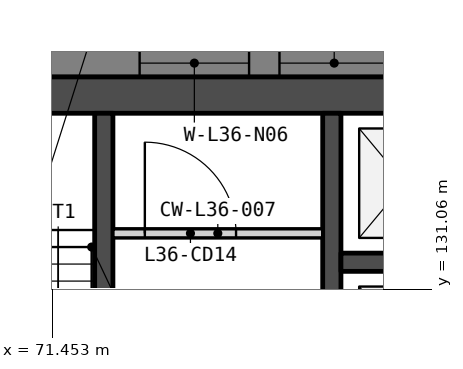
"""IFC4 building model, lengths in metres.
Left out: names, types, materials, properties, quantities, classifications, styles, units other than length and angle.
Written with IfcOpenShell. Run it as: python <this file> out.ifc"""

import sys

from ifc_helpers import new_model, si_unit, direction, frame, frame_2d, origin, place, context, subcontext, project, spatial, polyline, rectangle, outline, extrude, element, fill, save


model = new_model("IFC4")
c1 = context("Model", 3, precision=1e-05, world=origin(), true_north=direction((0.0, 1.0)))
c2 = subcontext(c1, "Body", "Model", "MODEL_VIEW")
j1 = project(units=[si_unit("LENGTHUNIT", "METRE"), si_unit("PLANEANGLEUNIT", "RADIAN")], contexts=[c1])
p1 = place(None, origin())
s1 = spatial("IfcSite", under=j1, at=p1, CompositionType="ELEMENT")
p2 = place(p1, origin())
s2 = spatial("IfcBuilding", under=s1, at=p2, CompositionType="ELEMENT")
p3 = place(p2, frame((0.0, 0.0, 144.2)))
s3 = spatial("IfcBuildingStorey", under=s2, at=p3, CompositionType="ELEMENT", Elevation=144.2)
p4 = place(p3, frame((69.0, 134.25, 0.0), z_axis=(0.0, 0.0, 1.0), x_axis=(1.0, 0.0, 0.0)))
e1 = element("IfcWall", 1, at=p4, inside=s3, PredefinedType="SOLIDWALL", context=c2, shape_type="SweptSolid", body=[
    extrude(rectangle(XDim=22.0, YDim=0.6, at=frame_2d((11.0, 0.0))), origin(), (0.0, 0.0, 1.0), 3.75),
])
p5 = place(p3, frame((72.3, 133.95, 0.0), z_axis=(0.0, 0.0, 1.0), x_axis=(0.0, -1.0, 0.0)))
e2 = element("IfcWall", 2, at=p5, inside=s3, PredefinedType="SOLIDWALL", context=c2, shape_type="SweptSolid", body=[
    extrude(rectangle(XDim=10.8, YDim=0.3, at=frame_2d((5.4, 0.0))), origin(), (0.0, 0.0, 1.0), 3.75),
])
p6 = place(p5, frame((6.95, 0.0, 0.0)))
e3 = element("IfcOpeningElement", 3, at=p6, cuts=e2, PredefinedType="OPENING", context=c2, shape_type="SweptSolid", body=[
    extrude(rectangle(XDim=1.1, YDim=2.1, at=frame_2d((0.55, 1.05))), frame((0.0, 0.16, 0.0), z_axis=(0.0, -1.0, 0.0), x_axis=(1.0, 0.0, 0.0)), (0.0, 0.0, 1.0), 0.32),
])
p7 = place(p5, frame((9.35, 0.0, 0.0)))
e4 = element("IfcOpeningElement", 4, at=p7, cuts=e2, PredefinedType="OPENING", context=c2, shape_type="SweptSolid", body=[
    extrude(rectangle(XDim=0.9, YDim=2.1, at=frame_2d((0.45, 1.05))), frame((0.0, 0.16, 0.0), z_axis=(0.0, -1.0, 0.0), x_axis=(1.0, 0.0, 0.0)), (0.0, 0.0, 1.0), 0.32),
])
p8 = place(p5, frame((5.1, 0.0, 0.0)))
e5 = element("IfcOpeningElement", 5, at=p8, cuts=e2, PredefinedType="OPENING", context=c2, shape_type="SweptSolid", body=[
    extrude(rectangle(XDim=1.0, YDim=2.1, at=frame_2d((0.5, 1.05))), frame((0.0, 0.16, 0.0), z_axis=(0.0, -1.0, 0.0), x_axis=(1.0, 0.0, 0.0)), (0.0, 0.0, 1.0), 0.32),
])
p9 = place(p3, frame((72.45, 131.975, 0.0), z_axis=(0.0, 0.0, 1.0), x_axis=(1.0, 0.0, 0.0)))
e6 = element("IfcWall", 6, at=p9, inside=s3, PredefinedType="PARTITIONING", context=c2, shape_type="SweptSolid", body=[
    extrude(rectangle(XDim=3.45, YDim=0.15, at=frame_2d((1.725, 0.0))), origin(), (0.0, 0.0, 1.0), 3.75),
])
p10 = place(p9, frame((0.525, 0.0, 0.0)))
e7 = element("IfcOpeningElement", 7, at=p10, cuts=e6, PredefinedType="OPENING", context=c2, shape_type="SweptSolid", body=[
    extrude(rectangle(XDim=1.5, YDim=2.1, at=frame_2d((0.75, 1.05))), frame((0.0, 0.085, 0.0), z_axis=(0.0, -1.0, 0.0), x_axis=(1.0, 0.0, 0.0)), (0.0, 0.0, 1.0), 0.17),
])
p11 = place(p3, frame((76.05, 133.95, 0.0), z_axis=(0.0, 0.0, 1.0), x_axis=(0.0, -1.0, 0.0)))
e8 = element("IfcWall", 8, at=p11, inside=s3, PredefinedType="SOLIDWALL", context=c2, shape_type="SweptSolid", body=[
    extrude(rectangle(XDim=8.25, YDim=0.3, at=frame_2d((4.125, 0.0))), origin(), (0.0, 0.0, 1.0), 3.75),
])
p12 = place(p3, frame((76.2, 131.5, 0.0), z_axis=(0.0, 0.0, 1.0), x_axis=(1.0, 0.0, 0.0)))
e9 = element("IfcWall", 9, at=p12, inside=s3, PredefinedType="SOLIDWALL", context=c2, shape_type="SweptSolid", body=[
    extrude(rectangle(XDim=2.1, YDim=0.3, at=frame_2d((1.05, 0.0))), origin(), (0.0, 0.0, 1.0), 3.75),
])
p13 = place(p3, frame((100.243, 134.775, -0.15), z_axis=(0.0, 0.0, 1.0), x_axis=(-1.0, 0.0, 0.0)))
e10 = element("IfcWall", 10, at=p13, inside=s3, PredefinedType="SOLIDWALL", context=c2, shape_type="SweptSolid", body=[
    extrude(outline(polyline([(0.0, 0.0), (0.0, 3.9), (33.425, 3.9), (33.425, 0.0), (0.0, 0.0)])), frame((0.0, 0.225, 0.0), z_axis=(0.0, -1.0, 0.0), x_axis=(1.0, 0.0, 0.0)), (0.0, 0.0, 1.0), 0.45),
])
p14 = place(p13, frame((3.011, 0.0, 0.95)))
e11 = element("IfcOpeningElement", 11, at=p14, cuts=e10, PredefinedType="OPENING", context=c2, shape_type="SweptSolid", body=[
    extrude(rectangle(XDim=1.8, YDim=2.2, at=frame_2d((0.9, 1.1))), frame((0.0, 0.235, 0.0), z_axis=(0.0, -1.0, 0.0), x_axis=(1.0, 0.0, 0.0)), (0.0, 0.0, 1.0), 0.47),
])
p15 = place(p13, frame((5.311, 0.0, 0.95)))
e12 = element("IfcOpeningElement", 12, at=p15, cuts=e10, PredefinedType="OPENING", context=c2, shape_type="SweptSolid", body=[
    extrude(rectangle(XDim=1.8, YDim=2.2, at=frame_2d((0.9, 1.1))), frame((0.0, 0.235, 0.0), z_axis=(0.0, -1.0, 0.0), x_axis=(1.0, 0.0, 0.0)), (0.0, 0.0, 1.0), 0.47),
])
p16 = place(p13, frame((13.132, 0.0, 0.95)))
e13 = element("IfcOpeningElement", 13, at=p16, cuts=e10, PredefinedType="OPENING", context=c2, shape_type="SweptSolid", body=[
    extrude(rectangle(XDim=1.8, YDim=2.2, at=frame_2d((0.9, 1.1))), frame((0.0, 0.235, 0.0), z_axis=(0.0, -1.0, 0.0), x_axis=(1.0, 0.0, 0.0)), (0.0, 0.0, 1.0), 0.47),
])
p17 = place(p13, frame((15.432, 0.0, 0.95)))
e14 = element("IfcOpeningElement", 14, at=p17, cuts=e10, PredefinedType="OPENING", context=c2, shape_type="SweptSolid", body=[
    extrude(rectangle(XDim=1.8, YDim=2.2, at=frame_2d((0.9, 1.1))), frame((0.0, 0.235, 0.0), z_axis=(0.0, -1.0, 0.0), x_axis=(1.0, 0.0, 0.0)), (0.0, 0.0, 1.0), 0.47),
])
p18 = place(p13, frame((23.254, 0.0, 0.95)))
e15 = element("IfcOpeningElement", 15, at=p18, cuts=e10, PredefinedType="OPENING", context=c2, shape_type="SweptSolid", body=[
    extrude(rectangle(XDim=1.8, YDim=2.2, at=frame_2d((0.9, 1.1))), frame((0.0, 0.235, 0.0), z_axis=(0.0, -1.0, 0.0), x_axis=(1.0, 0.0, 0.0)), (0.0, 0.0, 1.0), 0.47),
])
p19 = place(p13, frame((25.554, 0.0, 0.95)))
e16 = element("IfcOpeningElement", 16, at=p19, cuts=e10, PredefinedType="OPENING", context=c2, shape_type="SweptSolid", body=[
    extrude(rectangle(XDim=1.8, YDim=2.2, at=frame_2d((0.9, 1.1))), frame((0.0, 0.235, 0.0), z_axis=(0.0, -1.0, 0.0), x_axis=(1.0, 0.0, 0.0)), (0.0, 0.0, 1.0), 0.47),
])
p20 = place(p3, frame((57.652, 131.129, -0.15), z_axis=(0.0, 0.0, 1.0), x_axis=(0.499997369791, -0.866026922331, 0.0)))
e17 = element("IfcWall", 17, at=p20, inside=s3, PredefinedType="SOLIDWALL", context=c2, shape_type="SweptSolid", body=[
    extrude(outline(polyline([(40.486, 0.0), (40.486, 3.9), (0.0, 3.9), (0.0, 0.0), (40.486, 0.0)])), frame((0.0, 0.225, 0.0), z_axis=(0.0, -1.0, 0.0), x_axis=(1.0, 0.0, 0.0)), (0.0, 0.0, 1.0), 0.45),
])
p21 = place(p20, frame((3.011, 0.0, 0.95)))
e18 = element("IfcOpeningElement", 18, at=p21, cuts=e17, PredefinedType="OPENING", context=c2, shape_type="SweptSolid", body=[
    extrude(rectangle(XDim=1.8, YDim=2.2, at=frame_2d((0.9, 1.1))), frame((0.0, 0.235, 0.0), z_axis=(0.0, -1.0, 0.0), x_axis=(1.0, 0.0, 0.0)), (0.0, 0.0, 1.0), 0.47),
])
p22 = place(p20, frame((5.311, 0.0, 0.95)))
e19 = element("IfcOpeningElement", 19, at=p22, cuts=e17, PredefinedType="OPENING", context=c2, shape_type="SweptSolid", body=[
    extrude(rectangle(XDim=1.8, YDim=2.2, at=frame_2d((0.9, 1.1))), frame((0.0, 0.235, 0.0), z_axis=(0.0, -1.0, 0.0), x_axis=(1.0, 0.0, 0.0)), (0.0, 0.0, 1.0), 0.47),
])
p23 = place(p20, frame((13.132, 0.0, 0.95)))
e20 = element("IfcOpeningElement", 20, at=p23, cuts=e17, PredefinedType="OPENING", context=c2, shape_type="SweptSolid", body=[
    extrude(rectangle(XDim=1.8, YDim=2.2, at=frame_2d((0.9, 1.1))), frame((0.0, 0.235, 0.0), z_axis=(0.0, -1.0, 0.0), x_axis=(1.0, 0.0, 0.0)), (0.0, 0.0, 1.0), 0.47),
])
p24 = place(p20, frame((15.432, 0.0, 0.95)))
e21 = element("IfcOpeningElement", 21, at=p24, cuts=e17, PredefinedType="OPENING", context=c2, shape_type="SweptSolid", body=[
    extrude(rectangle(XDim=1.8, YDim=2.2, at=frame_2d((0.9, 1.1))), frame((0.0, 0.235, 0.0), z_axis=(0.0, -1.0, 0.0), x_axis=(1.0, 0.0, 0.0)), (0.0, 0.0, 1.0), 0.47),
])
p25 = place(p20, frame((23.254, 0.0, 0.95)))
e22 = element("IfcOpeningElement", 22, at=p25, cuts=e17, PredefinedType="OPENING", context=c2, shape_type="SweptSolid", body=[
    extrude(rectangle(XDim=1.8, YDim=2.2, at=frame_2d((0.9, 1.1))), frame((0.0, 0.235, 0.0), z_axis=(0.0, -1.0, 0.0), x_axis=(1.0, 0.0, 0.0)), (0.0, 0.0, 1.0), 0.47),
])
p26 = place(p20, frame((25.554, 0.0, 0.95)))
e23 = element("IfcOpeningElement", 23, at=p26, cuts=e17, PredefinedType="OPENING", context=c2, shape_type="SweptSolid", body=[
    extrude(rectangle(XDim=1.8, YDim=2.2, at=frame_2d((0.9, 1.1))), frame((0.0, 0.235, 0.0), z_axis=(0.0, -1.0, 0.0), x_axis=(1.0, 0.0, 0.0)), (0.0, 0.0, 1.0), 0.47),
])
p27 = place(p20, frame((33.375, 0.0, 0.95)))
e24 = element("IfcOpeningElement", 24, at=p27, cuts=e17, PredefinedType="OPENING", context=c2, shape_type="SweptSolid", body=[
    extrude(rectangle(XDim=1.8, YDim=2.2, at=frame_2d((0.9, 1.1))), frame((0.0, 0.235, 0.0), z_axis=(0.0, -1.0, 0.0), x_axis=(1.0, 0.0, 0.0)), (0.0, 0.0, 1.0), 0.47),
])
p28 = place(p20, frame((35.675, 0.0, 0.95)))
e25 = element("IfcOpeningElement", 25, at=p28, cuts=e17, PredefinedType="OPENING", context=c2, shape_type="SweptSolid", body=[
    extrude(rectangle(XDim=1.8, YDim=2.2, at=frame_2d((0.9, 1.1))), frame((0.0, 0.235, 0.0), z_axis=(0.0, -1.0, 0.0), x_axis=(1.0, 0.0, 0.0)), (0.0, 0.0, 1.0), 0.47),
])
p29 = place(p10, origin())
e26 = element("IfcDoor", 26, at=p29, inside=s3, OperationType="DOUBLE_DOOR_DOUBLE_SWING", PredefinedType="DOOR", context=c2, shape_type="SweptSolid", body=[
    extrude(rectangle(XDim=1.5, YDim=2.1, at=frame_2d((0.75, 1.05))), frame((0.0, 0.025, 0.0), z_axis=(0.0, -1.0, 0.0), x_axis=(1.0, 0.0, 0.0)), (0.0, 0.0, 1.0), 0.05),
])
fill(e7, e26)
p30 = place(p18, origin())
e27 = element("IfcWindow", 27, at=p30, inside=s3, PartitioningType="SINGLE_PANEL", PredefinedType="WINDOW", context=c2, shape_type="SweptSolid", body=[
    extrude(rectangle(XDim=1.8, YDim=2.2, at=frame_2d((0.9, 1.1))), frame((0.0, 0.03, 0.0), z_axis=(0.0, -1.0, 0.0), x_axis=(1.0, 0.0, 0.0)), (0.0, 0.0, 1.0), 0.06),
])
fill(e15, e27)
p31 = place(p19, origin())
e28 = element("IfcWindow", 28, at=p31, inside=s3, PartitioningType="SINGLE_PANEL", PredefinedType="WINDOW", context=c2, shape_type="SweptSolid", body=[
    extrude(rectangle(XDim=1.8, YDim=2.2, at=frame_2d((0.9, 1.1))), frame((0.0, 0.03, 0.0), z_axis=(0.0, -1.0, 0.0), x_axis=(1.0, 0.0, 0.0)), (0.0, 0.0, 1.0), 0.06),
])
fill(e16, e28)
save(model, sys.argv[1])
